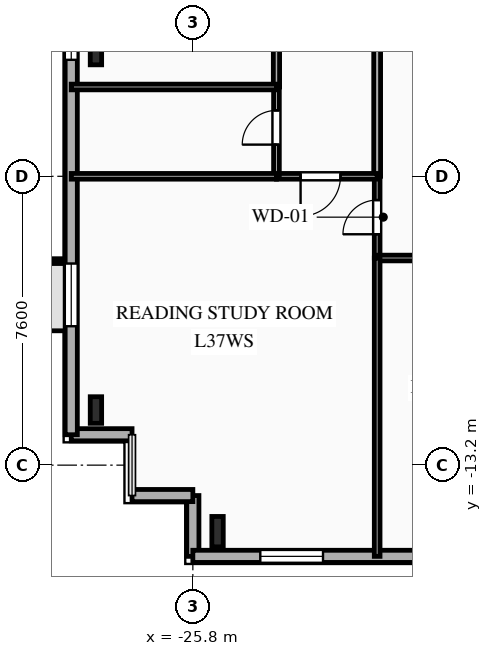
"""IFC4 building model, lengths in metres.
Left out: names, types, materials, properties, quantities, classifications, styles, units other than length and angle.
Written with IfcOpenShell. Run it as: python <this file> out.ifc"""

import sys

from ifc_helpers import new_model, si_unit, direction, frame, frame_2d, origin, origin_2d, place, context, subcontext, project, spatial, rectangle, i_section, extrude, element, fill, save


model = new_model("IFC4")
c1 = context("Model", 3, precision=1e-05, world=origin(), true_north=direction((0.0, 1.0)))
c2 = subcontext(c1, "Body", "Model", "MODEL_VIEW")
j1 = project(units=[si_unit("LENGTHUNIT", "METRE"), si_unit("PLANEANGLEUNIT", "RADIAN")], contexts=[c1])
p1 = place(None, origin())
s1 = spatial("IfcSite", under=j1, at=p1, CompositionType="ELEMENT")
p2 = place(p1, origin())
s2 = spatial("IfcBuilding", under=s1, at=p2, CompositionType="ELEMENT")
p3 = place(p2, frame((0.0, 0.0, 134.35)))
s3 = spatial("IfcBuildingStorey", under=s2, at=p3, CompositionType="ELEMENT", Elevation=134.35)
p4 = place(p3, frame((-25.15, -14.95, 0.0), z_axis=(0.0, 0.0, 1.0), x_axis=(1.0, 0.0, 0.0)))
e1 = element("IfcColumn", 1, at=p4, inside=s3, PredefinedType="COLUMN", context=c2, shape_type="SweptSolid", body=[
    extrude(i_section(OverallWidth=0.3, OverallDepth=0.8, WebThickness=0.018, FlangeThickness=0.033, FilletRadius=0.03, at=origin_2d()), origin(), (0.0, 0.0, 1.0), 3.35),
])
for number, where, z_axis, x_axis in (
    (2, (-28.35, -2.317, 0.0), (0.0, 0.0, 1.0), (1.0, 0.0, 0.0)),
    (3, (-28.35, -11.75, 0.0), (0.0, 0.0, 1.0), (1.0, 0.0, 0.0)),
):
    element("IfcColumn", number, at=place(p3, frame(where, z_axis=z_axis, x_axis=x_axis)), inside=s3, PredefinedType="COLUMN", context=c2, shape_type="SweptSolid", body=[
        extrude(i_section(OverallWidth=0.3, OverallDepth=0.7, WebThickness=0.017, FlangeThickness=0.032, FilletRadius=0.027, at=origin_2d()), origin(), (0.0, 0.0, 1.0), 3.35),
    ])
p5 = place(p3, frame((-25.8, -15.6, 0.0), z_axis=(0.0, 0.0, 1.0), x_axis=(0.0, 1.0, 0.0)))
e4 = element("IfcWall", 4, at=p5, inside=s3, PredefinedType="SOLIDWALL", context=c2, shape_type="SweptSolid", body=[
    extrude(rectangle(XDim=1.6, YDim=0.32, at=frame_2d((0.8, 0.0))), origin(), (0.0, 0.0, 1.0), 3.04),
])
p6 = place(p3, frame((-25.8, -14.0, 0.0), z_axis=(0.0, 0.0, 1.0), x_axis=(-1.0, 0.0, 0.0)))
e5 = element("IfcWall", 5, at=p6, inside=s3, PredefinedType="SOLIDWALL", context=c2, shape_type="SweptSolid", body=[
    extrude(rectangle(XDim=1.6, YDim=0.32, at=frame_2d((0.8, 0.0))), origin(), (0.0, 0.0, 1.0), 3.04),
])
p7 = place(p3, frame((-27.4, -12.4, 0.0), z_axis=(0.0, 0.0, 1.0), x_axis=(-1.0, 0.0, 0.0)))
e6 = element("IfcWall", 6, at=p7, inside=s3, PredefinedType="SOLIDWALL", context=c2, shape_type="SweptSolid", body=[
    extrude(rectangle(XDim=1.6, YDim=0.32, at=frame_2d((0.8, 0.0))), origin(), (0.0, 0.0, 1.0), 3.04),
])
p8 = place(p3, frame((-29.0, -12.4, 0.0), z_axis=(0.0, 0.0, 1.0), x_axis=(0.0, 1.0, 0.0)))
e7 = element("IfcWall", 7, at=p8, inside=s3, PredefinedType="SOLIDWALL", context=c2, shape_type="SweptSolid", body=[
    extrude(rectangle(XDim=29.6, YDim=0.32, at=frame_2d((14.8, 0.0))), origin(), (0.0, 0.0, 1.0), 3.04),
])
p9 = place(p8, frame((2.855, 0.0, 0.85)))
e8 = element("IfcOpeningElement", 8, at=p9, cuts=e7, PredefinedType="OPENING", context=c2, shape_type="SweptSolid", body=[
    extrude(rectangle(XDim=1.65, YDim=1.85, at=frame_2d((0.825, 0.925))), frame((0.0, 0.17, 0.0), z_axis=(0.0, -1.0, 0.0), x_axis=(1.0, 0.0, 0.0)), (0.0, 0.0, 1.0), 0.34),
])
p10 = place(p8, frame((9.865, 0.0, 0.85)))
e9 = element("IfcOpeningElement", 9, at=p10, cuts=e7, PredefinedType="OPENING", context=c2, shape_type="SweptSolid", body=[
    extrude(rectangle(XDim=1.95, YDim=1.85, at=frame_2d((0.975, 0.925))), frame((0.0, 0.17, 0.0), z_axis=(0.0, -1.0, 0.0), x_axis=(1.0, 0.0, 0.0)), (0.0, 0.0, 1.0), 0.34),
])
p11 = place(p8, frame((13.08, 0.0, 0.85)))
e10 = element("IfcOpeningElement", 10, at=p11, cuts=e7, PredefinedType="OPENING", context=c2, shape_type="SweptSolid", body=[
    extrude(rectangle(XDim=1.6, YDim=1.85, at=frame_2d((0.8, 0.925))), frame((0.0, 0.17, 0.0), z_axis=(0.0, -1.0, 0.0), x_axis=(1.0, 0.0, 0.0)), (0.0, 0.0, 1.0), 0.34),
])
p12 = place(p8, frame((15.88, 0.0, 0.85)))
e11 = element("IfcOpeningElement", 11, at=p12, cuts=e7, PredefinedType="OPENING", context=c2, shape_type="SweptSolid", body=[
    extrude(rectangle(XDim=1.6, YDim=1.85, at=frame_2d((0.8, 0.925))), frame((0.0, 0.17, 0.0), z_axis=(0.0, -1.0, 0.0), x_axis=(1.0, 0.0, 0.0)), (0.0, 0.0, 1.0), 0.34),
])
p13 = place(p8, frame((18.72, 0.0, 0.85)))
e12 = element("IfcOpeningElement", 12, at=p13, cuts=e7, PredefinedType="OPENING", context=c2, shape_type="SweptSolid", body=[
    extrude(rectangle(XDim=1.6, YDim=1.85, at=frame_2d((0.8, 0.925))), frame((0.0, 0.17, 0.0), z_axis=(0.0, -1.0, 0.0), x_axis=(1.0, 0.0, 0.0)), (0.0, 0.0, 1.0), 0.34),
])
p14 = place(p8, frame((24.255, 0.0, 0.85)))
e13 = element("IfcOpeningElement", 13, at=p14, cuts=e7, PredefinedType="OPENING", context=c2, shape_type="SweptSolid", body=[
    extrude(rectangle(XDim=1.65, YDim=1.85, at=frame_2d((0.825, 0.925))), frame((0.0, 0.17, 0.0), z_axis=(0.0, -1.0, 0.0), x_axis=(1.0, 0.0, 0.0)), (0.0, 0.0, 1.0), 0.34),
])
p15 = place(p3, frame((23.8, -15.6, 0.0), z_axis=(0.0, 0.0, 1.0), x_axis=(-1.0, 0.0, 0.0)))
e14 = element("IfcWall", 14, at=p15, inside=s3, PredefinedType="SOLIDWALL", context=c2, shape_type="SweptSolid", body=[
    extrude(rectangle(XDim=49.6, YDim=0.32, at=frame_2d((24.8, 0.0))), origin(), (0.0, 0.0, 1.0), 3.04),
])
p16 = place(p15, frame((1.13, 0.0, 0.85)))
e15 = element("IfcOpeningElement", 15, at=p16, cuts=e14, PredefinedType="OPENING", context=c2, shape_type="SweptSolid", body=[
    extrude(rectangle(XDim=1.1, YDim=1.85, at=frame_2d((0.55, 0.925))), frame((0.0, 0.17, 0.0), z_axis=(0.0, -1.0, 0.0), x_axis=(1.0, 0.0, 0.0)), (0.0, 0.0, 1.0), 0.34),
])
p17 = place(p15, frame((6.495, 0.0, 0.85)))
e16 = element("IfcOpeningElement", 16, at=p17, cuts=e14, PredefinedType="OPENING", context=c2, shape_type="SweptSolid", body=[
    extrude(rectangle(XDim=1.65, YDim=1.85, at=frame_2d((0.825, 0.925))), frame((0.0, 0.17, 0.0), z_axis=(0.0, -1.0, 0.0), x_axis=(1.0, 0.0, 0.0)), (0.0, 0.0, 1.0), 0.34),
])
p18 = place(p15, frame((13.996, 0.0, 0.85)))
e17 = element("IfcOpeningElement", 17, at=p18, cuts=e14, PredefinedType="OPENING", context=c2, shape_type="SweptSolid", body=[
    extrude(rectangle(XDim=2.2, YDim=1.85, at=frame_2d((1.1, 0.925))), frame((0.0, 0.17, 0.0), z_axis=(0.0, -1.0, 0.0), x_axis=(1.0, 0.0, 0.0)), (0.0, 0.0, 1.0), 0.34),
])
p19 = place(p15, frame((22.396, 0.0, 0.85)))
e18 = element("IfcOpeningElement", 18, at=p19, cuts=e14, PredefinedType="OPENING", context=c2, shape_type="SweptSolid", body=[
    extrude(rectangle(XDim=2.2, YDim=1.85, at=frame_2d((1.1, 0.925))), frame((0.0, 0.17, 0.0), z_axis=(0.0, -1.0, 0.0), x_axis=(1.0, 0.0, 0.0)), (0.0, 0.0, 1.0), 0.34),
])
p20 = place(p15, frame((30.2, 0.0, 0.85)))
e19 = element("IfcOpeningElement", 19, at=p20, cuts=e14, PredefinedType="OPENING", context=c2, shape_type="SweptSolid", body=[
    extrude(rectangle(XDim=2.2, YDim=1.85, at=frame_2d((1.1, 0.925))), frame((0.0, 0.17, 0.0), z_axis=(0.0, -1.0, 0.0), x_axis=(1.0, 0.0, 0.0)), (0.0, 0.0, 1.0), 0.34),
])
p21 = place(p15, frame((38.673, 0.0, 0.85)))
e20 = element("IfcOpeningElement", 20, at=p21, cuts=e14, PredefinedType="OPENING", context=c2, shape_type="SweptSolid", body=[
    extrude(rectangle(XDim=1.65, YDim=1.85, at=frame_2d((0.825, 0.925))), frame((0.0, 0.17, 0.0), z_axis=(0.0, -1.0, 0.0), x_axis=(1.0, 0.0, 0.0)), (0.0, 0.0, 1.0), 0.34),
])
p22 = place(p15, frame((46.175, 0.0, 0.85)))
e21 = element("IfcOpeningElement", 21, at=p22, cuts=e14, PredefinedType="OPENING", context=c2, shape_type="SweptSolid", body=[
    extrude(rectangle(XDim=1.65, YDim=1.85, at=frame_2d((0.825, 0.925))), frame((0.0, 0.17, 0.0), z_axis=(0.0, -1.0, 0.0), x_axis=(1.0, 0.0, 0.0)), (0.0, 0.0, 1.0), 0.34),
])
p23 = place(p3, frame((-20.95, -7.75, 0.0), z_axis=(0.0, 0.0, 1.0), x_axis=(0.0, 1.0, 0.0)))
e22 = element("IfcWall", 22, at=p23, inside=s3, PredefinedType="PARTITIONING", context=c2, shape_type="SweptSolid", body=[
    extrude(rectangle(XDim=2.15, YDim=0.15, at=frame_2d((1.075, 0.0))), origin(), (0.0, 0.0, 1.0), 3.04),
])
p24 = place(p23, frame((0.625, 0.0, 0.0)))
e23 = element("IfcOpeningElement", 23, at=p24, cuts=e22, PredefinedType="OPENING", context=c2, shape_type="SweptSolid", body=[
    extrude(rectangle(XDim=0.9, YDim=2.1, at=frame_2d((0.45, 1.05))), frame((0.0, 0.085, 0.0), z_axis=(0.0, -1.0, 0.0), x_axis=(1.0, 0.0, 0.0)), (0.0, 0.0, 1.0), 0.17),
])
p25 = place(p3, frame((-13.07, -7.75, 0.0), z_axis=(0.0, 0.0, 1.0), x_axis=(-1.0, 0.0, 0.0)))
e24 = element("IfcWall", 24, at=p25, inside=s3, PredefinedType="PARTITIONING", context=c2, shape_type="SweptSolid", body=[
    extrude(rectangle(XDim=7.88, YDim=0.15, at=frame_2d((3.94, 0.0))), origin(), (0.0, 0.0, 1.0), 3.04),
])
p26 = place(p25, frame((1.289, 0.0, 0.0)))
e25 = element("IfcOpeningElement", 25, at=p26, cuts=e24, PredefinedType="OPENING", context=c2, shape_type="SweptSolid", body=[
    extrude(rectangle(XDim=1.05, YDim=2.15, at=frame_2d((0.525, 1.075))), frame((0.0, 0.085, 0.0), z_axis=(0.0, -1.0, 0.0), x_axis=(1.0, 0.0, 0.0)), (0.0, 0.0, 1.0), 0.17),
])
p27 = place(p3, frame((-20.95, -5.6, 0.0), z_axis=(0.0, 0.0, 1.0), x_axis=(0.0, 1.0, 0.0)))
e26 = element("IfcWall", 26, at=p27, inside=s3, PredefinedType="PARTITIONING", context=c2, shape_type="SweptSolid", body=[
    extrude(rectangle(XDim=14.1, YDim=0.18, at=frame_2d((7.05, 0.0))), origin(), (0.0, 0.0, 1.0), 3.04),
])
p28 = place(p27, frame((5.058, 0.0, 0.0)))
e27 = element("IfcOpeningElement", 27, at=p28, cuts=e26, PredefinedType="OPENING", context=c2, shape_type="SweptSolid", body=[
    extrude(rectangle(XDim=1.0, YDim=2.15, at=frame_2d((0.5, 1.075))), frame((0.0, 0.1, 0.0), z_axis=(0.0, -1.0, 0.0), x_axis=(1.0, 0.0, 0.0)), (0.0, 0.0, 1.0), 0.2),
])
p29 = place(p3, frame((-20.95, -5.6, 0.0), z_axis=(0.0, 0.0, 1.0), x_axis=(-1.0, 0.0, 0.0)))
e28 = element("IfcWall", 28, at=p29, inside=s3, PredefinedType="PARTITIONING", context=c2, shape_type="SweptSolid", body=[
    extrude(rectangle(XDim=2.65, YDim=0.15, at=frame_2d((1.325, 0.0))), origin(), (0.0, 0.0, 1.0), 3.04),
])
p30 = place(p29, frame((0.965, 0.0, 0.0)))
e29 = element("IfcOpeningElement", 29, at=p30, cuts=e28, PredefinedType="OPENING", context=c2, shape_type="SweptSolid", body=[
    extrude(rectangle(XDim=1.05, YDim=2.15, at=frame_2d((0.525, 1.075))), frame((0.0, 0.085, 0.0), z_axis=(0.0, -1.0, 0.0), x_axis=(1.0, 0.0, 0.0)), (0.0, 0.0, 1.0), 0.17),
])
p31 = place(p3, frame((-23.6, -5.6, 0.0), z_axis=(0.0, 0.0, 1.0), x_axis=(0.0, 1.0, 0.0)))
e30 = element("IfcWall", 30, at=p31, inside=s3, PredefinedType="PLUMBINGWALL", context=c2, shape_type="SweptSolid", body=[
    extrude(rectangle(XDim=2.35, YDim=0.15, at=frame_2d((1.175, 0.0))), origin(), (0.0, 0.0, 1.0), 2.695),
])
p32 = place(p31, frame((0.834, 0.0, 0.0)))
e31 = element("IfcOpeningElement", 31, at=p32, cuts=e30, PredefinedType="OPENING", context=c2, shape_type="SweptSolid", body=[
    extrude(rectangle(XDim=0.9, YDim=2.1, at=frame_2d((0.45, 1.05))), frame((0.0, 0.085, 0.0), z_axis=(0.0, -1.0, 0.0), x_axis=(1.0, 0.0, 0.0)), (0.0, 0.0, 1.0), 0.17),
])
p33 = place(p3, frame((-23.6, -3.25, 0.0), z_axis=(0.0, 0.0, 1.0), x_axis=(0.0, 1.0, 0.0)))
e32 = element("IfcWall", 32, at=p33, inside=s3, PredefinedType="PARTITIONING", context=c2, shape_type="SweptSolid", body=[
    extrude(rectangle(XDim=3.29, YDim=0.165, at=frame_2d((1.645, 0.0))), origin(), (0.0, 0.0, 1.0), 2.695),
])
p34 = place(p33, frame((1.438, 0.0, 0.0)))
e33 = element("IfcOpeningElement", 33, at=p34, cuts=e32, PredefinedType="OPENING", context=c2, shape_type="SweptSolid", body=[
    extrude(rectangle(XDim=1.15, YDim=2.15, at=frame_2d((0.575, 1.075))), frame((0.0, 0.093, 0.0), z_axis=(0.0, -1.0, 0.0), x_axis=(1.0, 0.0, 0.0)), (0.0, 0.0, 1.0), 0.185),
])
p35 = place(p3, frame((-29.0, -5.6, 0.0), z_axis=(0.0, 0.0, 1.0), x_axis=(1.0, 0.0, 0.0)))
e34 = element("IfcWall", 34, at=p35, inside=s3, PredefinedType="PLUMBINGWALL", context=c2, shape_type="SweptSolid", body=[
    extrude(rectangle(XDim=5.4, YDim=0.15, at=frame_2d((2.7, 0.0))), origin(), (0.0, 0.0, 1.0), 3.04),
])
p36 = place(p3, frame((-20.95, -7.75, 0.0), z_axis=(0.0, 0.0, 1.0), x_axis=(0.0, -1.0, 0.0)))
e35 = element("IfcWall", 35, at=p36, inside=s3, PredefinedType="PARTITIONING", context=c2, shape_type="SweptSolid", body=[
    extrude(rectangle(XDim=7.85, YDim=0.15, at=frame_2d((3.925, 0.0))), origin(), (0.0, 0.0, 1.0), 3.04),
])
p37 = place(p3, frame((-29.0, -3.25, 0.0), z_axis=(0.0, 0.0, 1.0), x_axis=(1.0, 0.0, 0.0)))
e36 = element("IfcWall", 36, at=p37, inside=s3, PredefinedType="PLUMBINGWALL", context=c2, shape_type="SweptSolid", body=[
    extrude(rectangle(XDim=5.4, YDim=0.15, at=frame_2d((2.7, 0.0))), origin(), (0.0, 0.0, 1.0), 3.04),
])
p38 = place(p9, origin())
e37 = element("IfcWindow", 37, at=p38, inside=s3, PartitioningType="SINGLE_PANEL", PredefinedType="WINDOW", context=c2, shape_type="SweptSolid", body=[
    extrude(rectangle(XDim=1.65, YDim=1.85, at=frame_2d((0.825, 0.925))), frame((0.0, 0.03, 0.0), z_axis=(0.0, -1.0, 0.0), x_axis=(1.0, 0.0, 0.0)), (0.0, 0.0, 1.0), 0.06),
])
fill(e8, e37)
p39 = place(p10, origin())
e38 = element("IfcWindow", 38, at=p39, inside=s3, PartitioningType="SINGLE_PANEL", PredefinedType="WINDOW", context=c2, shape_type="SweptSolid", body=[
    extrude(rectangle(XDim=1.95, YDim=1.85, at=frame_2d((0.975, 0.925))), frame((0.0, 0.03, 0.0), z_axis=(0.0, -1.0, 0.0), x_axis=(1.0, 0.0, 0.0)), (0.0, 0.0, 1.0), 0.06),
])
fill(e9, e38)
p40 = place(p22, origin())
e39 = element("IfcWindow", 39, at=p40, inside=s3, PartitioningType="SINGLE_PANEL", PredefinedType="WINDOW", context=c2, shape_type="SweptSolid", body=[
    extrude(rectangle(XDim=1.65, YDim=1.85, at=frame_2d((0.825, 0.925))), frame((0.0, 0.03, 0.0), z_axis=(0.0, -1.0, 0.0), x_axis=(1.0, 0.0, 0.0)), (0.0, 0.0, 1.0), 0.06),
])
fill(e21, e39)
p41 = place(p24, origin())
e40 = element("IfcDoor", 40, at=p41, inside=s3, OperationType="SINGLE_SWING_LEFT", PredefinedType="DOOR", context=c2, shape_type="SweptSolid", body=[
    extrude(rectangle(XDim=0.9, YDim=2.1, at=frame_2d((0.45, 1.05))), frame((0.0, 0.025, 0.0), z_axis=(0.0, -1.0, 0.0), x_axis=(1.0, 0.0, 0.0)), (0.0, 0.0, 1.0), 0.05),
])
fill(e23, e40)
p42 = place(p30, origin())
e41 = element("IfcDoor", 41, at=p42, inside=s3, OperationType="SINGLE_SWING_RIGHT", PredefinedType="DOOR", context=c2, shape_type="SweptSolid", body=[
    extrude(rectangle(XDim=1.05, YDim=2.15, at=frame_2d((0.525, 1.075))), frame((0.0, 0.025, 0.0), z_axis=(0.0, -1.0, 0.0), x_axis=(1.0, 0.0, 0.0)), (0.0, 0.0, 1.0), 0.05),
])
fill(e29, e41)
p43 = place(p32, origin())
e42 = element("IfcDoor", 42, at=p43, inside=s3, OperationType="SINGLE_SWING_LEFT", PredefinedType="DOOR", context=c2, shape_type="SweptSolid", body=[
    extrude(rectangle(XDim=0.9, YDim=2.1, at=frame_2d((0.45, 1.05))), frame((0.0, 0.025, 0.0), z_axis=(0.0, -1.0, 0.0), x_axis=(1.0, 0.0, 0.0)), (0.0, 0.0, 1.0), 0.05),
])
fill(e31, e42)
save(model, sys.argv[1])
